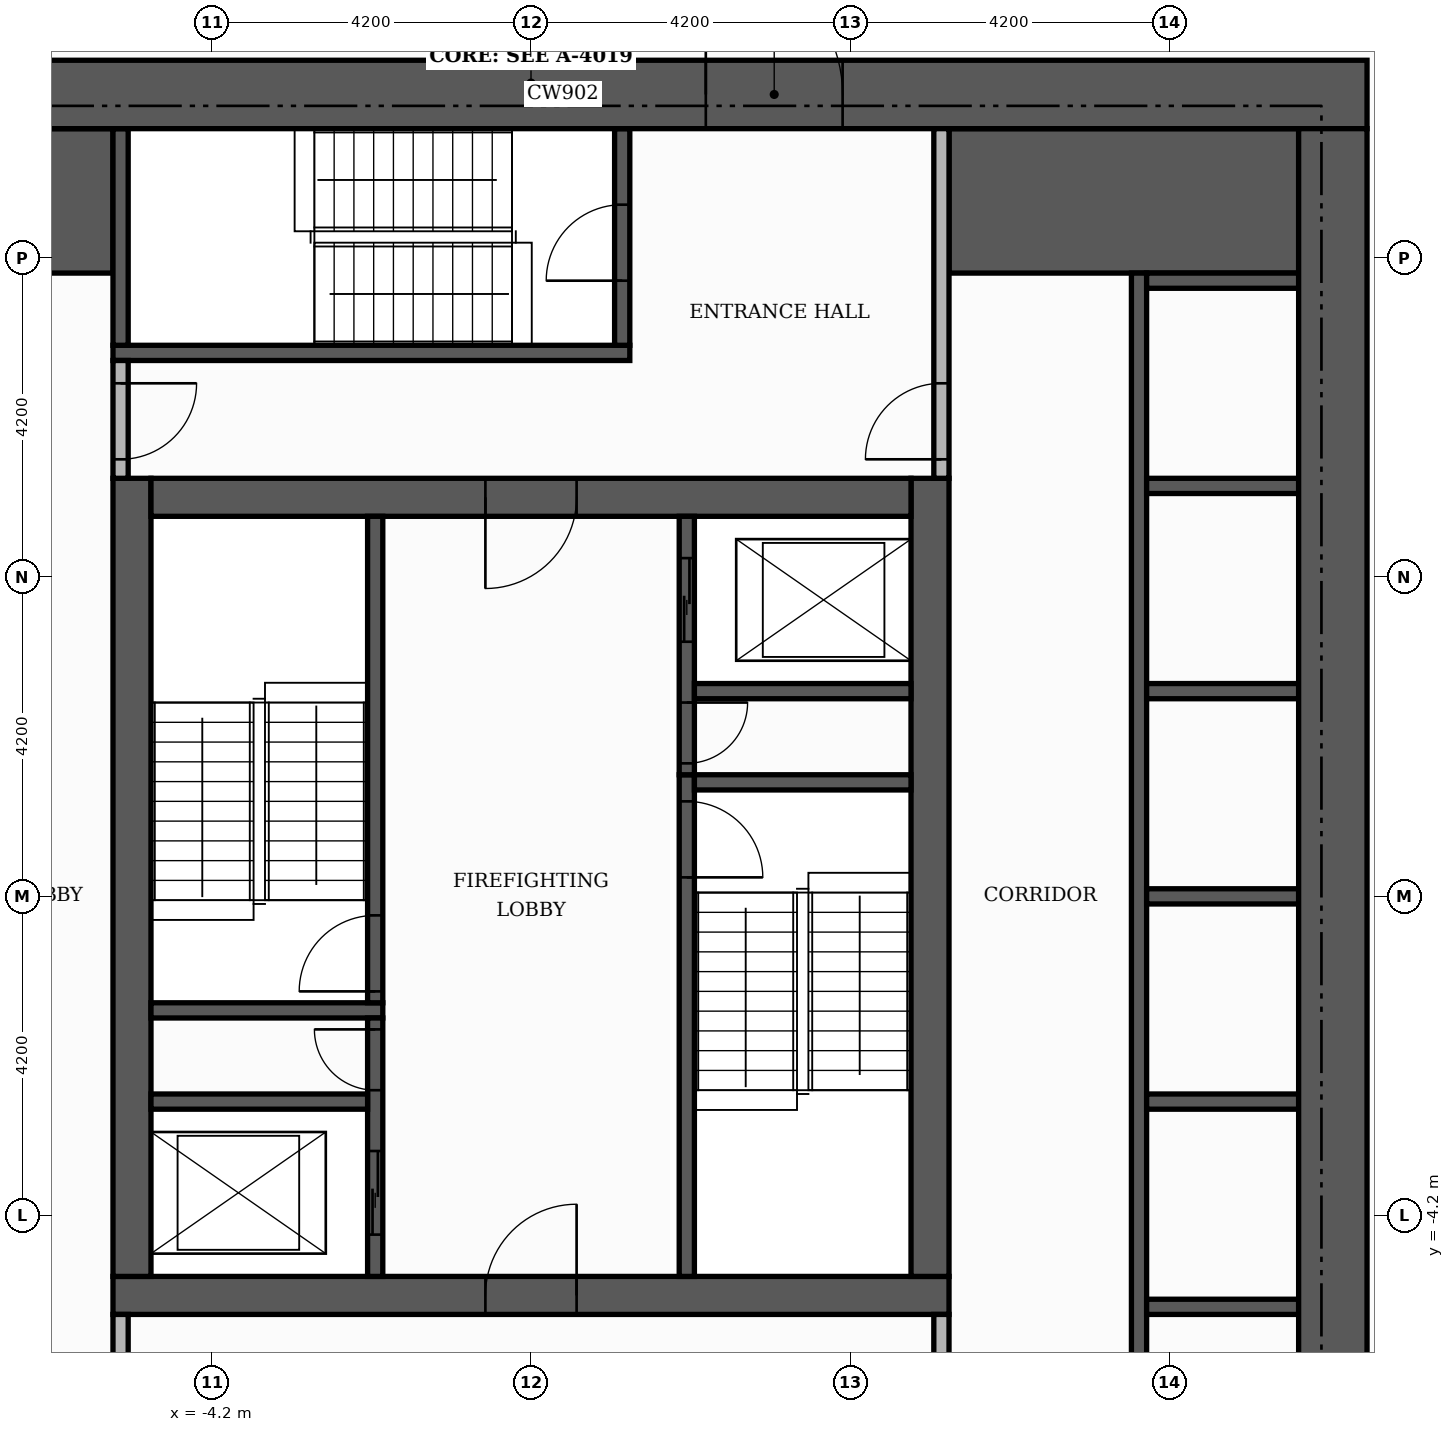
"""IFC4 building model, lengths in metres.
Left out: names, types, materials, properties, quantities, classifications, styles, units other than length and angle.
Written with IfcOpenShell. Run it as: python <this file> out.ifc"""

import sys

from ifc_helpers import new_model, si_unit, direction, frame, frame_2d, origin, place, context, subcontext, project, spatial, rectangle, extrude, element, fill, save


model = new_model("IFC4")
c1 = context("Model", 3, precision=1e-05, world=origin(), true_north=direction((0.0, 1.0)))
c2 = subcontext(c1, "Body", "Model", "MODEL_VIEW")
j1 = project(units=[si_unit("LENGTHUNIT", "METRE"), si_unit("PLANEANGLEUNIT", "RADIAN")], contexts=[c1])
p1 = place(None, origin())
s1 = spatial("IfcSite", under=j1, at=p1, CompositionType="ELEMENT")
p2 = place(p1, origin())
s2 = spatial("IfcBuilding", under=s1, at=p2, CompositionType="ELEMENT")
p3 = place(p2, frame((0.0, 0.0, 122.1)))
s3 = spatial("IfcBuildingStorey", under=s2, at=p3, CompositionType="ELEMENT", Elevation=122.1)
p4 = place(p3, frame((-5.5, -5.25, 0.0), z_axis=(0.0, 0.0, 1.0), x_axis=(1.0, 0.0, 0.0)))
e1 = element("IfcWall", 1, at=p4, inside=s3, PredefinedType="SHEAR", context=c2, shape_type="SweptSolid", body=[
    extrude(rectangle(XDim=11.0, YDim=0.5, at=frame_2d((5.5, 0.0))), origin(), (0.0, 0.0, 1.0), 3.4),
])
p5 = place(p4, frame((4.9, 0.0, 0.0)))
e2 = element("IfcOpeningElement", 2, at=p5, cuts=e1, PredefinedType="OPENING", context=c2, shape_type="SweptSolid", body=[
    extrude(rectangle(XDim=1.2, YDim=2.1, at=frame_2d((0.6, 1.05))), frame((0.0, 0.26, 0.0), z_axis=(0.0, -1.0, 0.0), x_axis=(1.0, 0.0, 0.0)), (0.0, 0.0, 1.0), 0.52),
])
for number, where, z_axis, x_axis in (
    (3, (-5.25, -5.0, 0.0), (0.0, 0.0, 1.0), (0.0, 1.0, 0.0)),
    (4, (5.25, -5.0, 0.0), (0.0, 0.0, 1.0), (0.0, 1.0, 0.0)),
):
    element("IfcWall", number, at=place(p3, frame(where, z_axis=z_axis, x_axis=x_axis)), inside=s3, PredefinedType="SHEAR", context=c2, shape_type="SweptSolid", body=[
        extrude(rectangle(XDim=10.5, YDim=0.5, at=frame_2d((5.25, 0.0))), origin(), (0.0, 0.0, 1.0), 3.4),
    ])
p6 = place(p3, frame((-5.0, 5.25, 0.0), z_axis=(0.0, 0.0, 1.0), x_axis=(1.0, 0.0, 0.0)))
e5 = element("IfcWall", 5, at=p6, inside=s3, PredefinedType="SHEAR", context=c2, shape_type="SweptSolid", body=[
    extrude(rectangle(XDim=10.0, YDim=0.5, at=frame_2d((5.0, 0.0))), origin(), (0.0, 0.0, 1.0), 3.4),
])
p7 = place(p6, frame((4.4, 0.0, 0.0)))
e6 = element("IfcOpeningElement", 6, at=p7, cuts=e5, PredefinedType="OPENING", context=c2, shape_type="SweptSolid", body=[
    extrude(rectangle(XDim=1.2, YDim=2.1, at=frame_2d((0.6, 1.05))), frame((0.0, 0.26, 0.0), z_axis=(0.0, -1.0, 0.0), x_axis=(1.0, 0.0, 0.0)), (0.0, 0.0, 1.0), 0.52),
])
for number, where, z_axis, x_axis in (
    (7, (-10.1, 9.15, 0.0), (0.0, 0.0, 1.0), (1.0, 0.0, 0.0)),
    (8, (5.5, 9.15, 0.0), (0.0, 0.0, 1.0), (1.0, 0.0, 0.0)),
):
    element("IfcWall", number, at=place(p3, frame(where, z_axis=z_axis, x_axis=x_axis)), inside=s3, PredefinedType="SHEAR", context=c2, shape_type="SweptSolid", body=[
        extrude(rectangle(XDim=4.6, YDim=1.9, at=frame_2d((2.3, 0.0))), origin(), (0.0, 0.0, 1.0), 3.4),
    ])
p8 = place(p3, frame((2.05, -5.0, 0.0), z_axis=(0.0, 0.0, 1.0), x_axis=(0.0, 1.0, 0.0)))
e9 = element("IfcWall", 9, at=p8, inside=s3, PredefinedType="SHEAR", context=c2, shape_type="SweptSolid", body=[
    extrude(rectangle(XDim=6.6, YDim=0.2, at=frame_2d((3.3, 0.0))), origin(), (0.0, 0.0, 1.0), 3.4),
])
p9 = place(p8, frame((5.25, 0.0, 0.0)))
e10 = element("IfcOpeningElement", 10, at=p9, cuts=e9, PredefinedType="OPENING", context=c2, shape_type="SweptSolid", body=[
    extrude(rectangle(XDim=1.0, YDim=2.1, at=frame_2d((0.5, 1.05))), frame((0.0, 0.11, 0.0), z_axis=(0.0, -1.0, 0.0), x_axis=(1.0, 0.0, 0.0)), (0.0, 0.0, 1.0), 0.22),
])
p10 = place(p3, frame((-5.0, -1.5, 0.0), z_axis=(0.0, 0.0, 1.0), x_axis=(1.0, 0.0, 0.0)))
e11 = element("IfcWall", 11, at=p10, inside=s3, PredefinedType="SHEAR", context=c2, shape_type="SweptSolid", body=[
    extrude(rectangle(XDim=3.05, YDim=0.2, at=frame_2d((1.525, 0.0))), origin(), (0.0, 0.0, 1.0), 3.4),
])
p11 = place(p3, frame((-2.05, -1.4, 0.0), z_axis=(0.0, 0.0, 1.0), x_axis=(0.0, 1.0, 0.0)))
e12 = element("IfcWall", 12, at=p11, inside=s3, PredefinedType="SHEAR", context=c2, shape_type="SweptSolid", body=[
    extrude(rectangle(XDim=6.4, YDim=0.2, at=frame_2d((3.2, 0.0))), origin(), (0.0, 0.0, 1.0), 3.4),
])
p12 = place(p11, frame((0.15, 0.0, 0.0)))
e13 = element("IfcOpeningElement", 13, at=p12, cuts=e12, PredefinedType="OPENING", context=c2, shape_type="SweptSolid", body=[
    extrude(rectangle(XDim=1.0, YDim=2.1, at=frame_2d((0.5, 1.05))), frame((0.0, 0.11, 0.0), z_axis=(0.0, -1.0, 0.0), x_axis=(1.0, 0.0, 0.0)), (0.0, 0.0, 1.0), 0.22),
])
p13 = place(p3, frame((2.15, 1.5, 0.0), z_axis=(0.0, 0.0, 1.0), x_axis=(1.0, 0.0, 0.0)))
e14 = element("IfcWall", 14, at=p13, inside=s3, PredefinedType="SHEAR", context=c2, shape_type="SweptSolid", body=[
    extrude(rectangle(XDim=2.85, YDim=0.2, at=frame_2d((1.425, 0.0))), origin(), (0.0, 0.0, 1.0), 3.4),
])
p14 = place(p3, frame((-5.5, 7.15, 0.0), z_axis=(0.0, 0.0, 1.0), x_axis=(1.0, 0.0, 0.0)))
e15 = element("IfcWall", 15, at=p14, inside=s3, PredefinedType="SHEAR", context=c2, shape_type="SweptSolid", body=[
    extrude(rectangle(XDim=6.8, YDim=0.2, at=frame_2d((3.4, 0.0))), origin(), (0.0, 0.0, 1.0), 3.4),
])
p15 = place(p3, frame((-5.4, 7.25, 0.0), z_axis=(0.0, 0.0, 1.0), x_axis=(0.0, 1.0, 0.0)))
e16 = element("IfcWall", 16, at=p15, inside=s3, PredefinedType="SHEAR", context=c2, shape_type="SweptSolid", body=[
    extrude(rectangle(XDim=2.85, YDim=0.2, at=frame_2d((1.425, 0.0))), origin(), (0.0, 0.0, 1.0), 3.4),
])
p16 = place(p3, frame((1.2, 7.25, 0.0), z_axis=(0.0, 0.0, 1.0), x_axis=(0.0, 1.0, 0.0)))
e17 = element("IfcWall", 17, at=p16, inside=s3, PredefinedType="SHEAR", context=c2, shape_type="SweptSolid", body=[
    extrude(rectangle(XDim=2.85, YDim=0.2, at=frame_2d((1.425, 0.0))), origin(), (0.0, 0.0, 1.0), 3.4),
])
p17 = place(p16, frame((0.85, 0.0, 0.0)))
e18 = element("IfcOpeningElement", 18, at=p17, cuts=e17, PredefinedType="OPENING", context=c2, shape_type="SweptSolid", body=[
    extrude(rectangle(XDim=1.0, YDim=2.1, at=frame_2d((0.5, 1.05))), frame((0.0, 0.11, 0.0), z_axis=(0.0, -1.0, 0.0), x_axis=(1.0, 0.0, 0.0)), (0.0, 0.0, 1.0), 0.22),
])
p18 = place(p3, frame((8.0, -8.2, 0.0), z_axis=(0.0, 0.0, 1.0), x_axis=(0.0, 1.0, 0.0)))
e19 = element("IfcWall", 19, at=p18, inside=s3, PredefinedType="SHEAR", context=c2, shape_type="SweptSolid", body=[
    extrude(rectangle(XDim=16.4, YDim=0.2, at=frame_2d((8.2, 0.0))), origin(), (0.0, 0.0, 1.0), 3.4),
])
p19 = place(p3, frame((8.1, -5.4, 0.0), z_axis=(0.0, 0.0, 1.0), x_axis=(1.0, 0.0, 0.0)))
e20 = element("IfcWall", 20, at=p19, inside=s3, PredefinedType="SHEAR", context=c2, shape_type="SweptSolid", body=[
    extrude(rectangle(XDim=2.0, YDim=0.2, at=frame_2d((1.0, 0.0))), origin(), (0.0, 0.0, 1.0), 3.4),
])
p20 = place(p3, frame((-2.05, -5.0, 0.0), z_axis=(0.0, 0.0, 1.0), x_axis=(0.0, 1.0, 0.0)))
e21 = element("IfcWall", 21, at=p20, inside=s3, PredefinedType="SHEAR", context=c2, shape_type="SweptSolid", body=[
    extrude(rectangle(XDim=3.4, YDim=0.2, at=frame_2d((1.7, 0.0))), origin(), (0.0, 0.0, 1.0), 3.4),
])
p21 = place(p20, frame((0.55, 0.0, 0.0)))
e22 = element("IfcOpeningElement", 22, at=p21, cuts=e21, PredefinedType="OPENING", context=c2, shape_type="SweptSolid", body=[
    extrude(rectangle(XDim=1.1, YDim=2.1, at=frame_2d((0.55, 1.05))), frame((0.0, 0.11, 0.0), z_axis=(0.0, -1.0, 0.0), x_axis=(1.0, 0.0, 0.0)), (0.0, 0.0, 1.0), 0.22),
])
p22 = place(p20, frame((2.45, 0.0, 0.0)))
e23 = element("IfcOpeningElement", 23, at=p22, cuts=e21, PredefinedType="OPENING", context=c2, shape_type="SweptSolid", body=[
    extrude(rectangle(XDim=0.8, YDim=2.1, at=frame_2d((0.4, 1.05))), frame((0.0, 0.11, 0.0), z_axis=(0.0, -1.0, 0.0), x_axis=(1.0, 0.0, 0.0)), (0.0, 0.0, 1.0), 0.22),
])
p23 = place(p3, frame((-5.0, -2.7, 0.0), z_axis=(0.0, 0.0, 1.0), x_axis=(1.0, 0.0, 0.0)))
e24 = element("IfcWall", 24, at=p23, inside=s3, PredefinedType="SHEAR", context=c2, shape_type="SweptSolid", body=[
    extrude(rectangle(XDim=2.85, YDim=0.2, at=frame_2d((1.425, 0.0))), origin(), (0.0, 0.0, 1.0), 3.4),
])
for number, where, z_axis, x_axis in (
    (25, (8.1, -2.7, 0.0), (0.0, 0.0, 1.0), (1.0, 0.0, 0.0)),
    (26, (8.1, 0.0, 0.0), (0.0, 0.0, 1.0), (1.0, 0.0, 0.0)),
):
    element("IfcWall", number, at=place(p3, frame(where, z_axis=z_axis, x_axis=x_axis)), inside=s3, PredefinedType="SHEAR", context=c2, shape_type="SweptSolid", body=[
        extrude(rectangle(XDim=2.0, YDim=0.2, at=frame_2d((1.0, 0.0))), origin(), (0.0, 0.0, 1.0), 3.4),
    ])
p24 = place(p3, frame((2.05, 1.6, 0.0), z_axis=(0.0, 0.0, 1.0), x_axis=(0.0, 1.0, 0.0)))
e27 = element("IfcWall", 27, at=p24, inside=s3, PredefinedType="SHEAR", context=c2, shape_type="SweptSolid", body=[
    extrude(rectangle(XDim=3.4, YDim=0.2, at=frame_2d((1.7, 0.0))), origin(), (0.0, 0.0, 1.0), 3.4),
])
p25 = place(p24, frame((1.75, 0.0, 0.0)))
e28 = element("IfcOpeningElement", 28, at=p25, cuts=e27, PredefinedType="OPENING", context=c2, shape_type="SweptSolid", body=[
    extrude(rectangle(XDim=1.1, YDim=2.1, at=frame_2d((0.55, 1.05))), frame((0.0, 0.11, 0.0), z_axis=(0.0, -1.0, 0.0), x_axis=(1.0, 0.0, 0.0)), (0.0, 0.0, 1.0), 0.22),
])
p26 = place(p24, frame((0.15, 0.0, 0.0)))
e29 = element("IfcOpeningElement", 29, at=p26, cuts=e27, PredefinedType="OPENING", context=c2, shape_type="SweptSolid", body=[
    extrude(rectangle(XDim=0.8, YDim=2.1, at=frame_2d((0.4, 1.05))), frame((0.0, 0.11, 0.0), z_axis=(0.0, -1.0, 0.0), x_axis=(1.0, 0.0, 0.0)), (0.0, 0.0, 1.0), 0.22),
])
p27 = place(p3, frame((2.15, 2.7, 0.0), z_axis=(0.0, 0.0, 1.0), x_axis=(1.0, 0.0, 0.0)))
e30 = element("IfcWall", 30, at=p27, inside=s3, PredefinedType="SHEAR", context=c2, shape_type="SweptSolid", body=[
    extrude(rectangle(XDim=2.85, YDim=0.2, at=frame_2d((1.425, 0.0))), origin(), (0.0, 0.0, 1.0), 3.4),
])
for number, where, z_axis, x_axis in (
    (31, (8.1, 2.7, 0.0), (0.0, 0.0, 1.0), (1.0, 0.0, 0.0)),
    (32, (8.1, 5.4, 0.0), (0.0, 0.0, 1.0), (1.0, 0.0, 0.0)),
    (33, (8.1, 8.1, 0.0), (0.0, 0.0, 1.0), (1.0, 0.0, 0.0)),
):
    element("IfcWall", number, at=place(p3, frame(where, z_axis=z_axis, x_axis=x_axis)), inside=s3, PredefinedType="SHEAR", context=c2, shape_type="SweptSolid", body=[
        extrude(rectangle(XDim=2.0, YDim=0.2, at=frame_2d((1.0, 0.0))), origin(), (0.0, 0.0, 1.0), 3.4),
    ])
p28 = place(p3, frame((-11.0, 10.55, 0.0), z_axis=(0.0, 0.0, 1.0), x_axis=(1.0, 0.0, 0.0)))
e34 = element("IfcWall", 34, at=p28, inside=s3, PredefinedType="SHEAR", context=c2, shape_type="SweptSolid", body=[
    extrude(rectangle(XDim=22.0, YDim=0.9, at=frame_2d((11.0, 0.0))), origin(), (0.0, 0.0, 1.0), 3.4),
])
p29 = place(p28, frame((13.3, 0.0, 0.0)))
e35 = element("IfcOpeningElement", 35, at=p29, cuts=e34, PredefinedType="OPENING", context=c2, shape_type="SweptSolid", body=[
    extrude(rectangle(XDim=1.8, YDim=2.2, at=frame_2d((0.9, 1.1))), frame((0.0, 0.46, 0.0), z_axis=(0.0, -1.0, 0.0), x_axis=(1.0, 0.0, 0.0)), (0.0, 0.0, 1.0), 0.92),
])
p30 = place(p3, frame((10.55, -10.1, 0.0), z_axis=(0.0, 0.0, 1.0), x_axis=(0.0, 1.0, 0.0)))
e36 = element("IfcWall", 36, at=p30, inside=s3, PredefinedType="SHEAR", context=c2, shape_type="SweptSolid", body=[
    extrude(rectangle(XDim=20.2, YDim=0.9, at=frame_2d((10.1, 0.0))), origin(), (0.0, 0.0, 1.0), 3.4),
])
p31 = place(p3, frame((-5.4, -10.1, 0.0), z_axis=(0.0, 0.0, 1.0), x_axis=(0.0, 1.0, 0.0)))
e37 = element("IfcWall", 37, at=p31, inside=s3, PredefinedType="PARTITIONING", context=c2, shape_type="SweptSolid", body=[
    extrude(rectangle(XDim=4.6, YDim=0.2, at=frame_2d((2.3, 0.0))), origin(), (0.0, 0.0, 1.0), 3.4),
])
p32 = place(p31, frame((2.9, 0.0, 0.0)))
e38 = element("IfcOpeningElement", 38, at=p32, cuts=e37, PredefinedType="OPENING", context=c2, shape_type="SweptSolid", body=[
    extrude(rectangle(XDim=1.0, YDim=2.1, at=frame_2d((0.5, 1.05))), frame((0.0, 0.11, 0.0), z_axis=(0.0, -1.0, 0.0), x_axis=(1.0, 0.0, 0.0)), (0.0, 0.0, 1.0), 0.22),
])
p33 = place(p3, frame((5.4, -7.9, 0.0), z_axis=(0.0, 0.0, 1.0), x_axis=(0.0, 1.0, 0.0)))
e39 = element("IfcWall", 39, at=p33, inside=s3, PredefinedType="PARTITIONING", context=c2, shape_type="SweptSolid", body=[
    extrude(rectangle(XDim=2.4, YDim=0.2, at=frame_2d((1.2, 0.0))), origin(), (0.0, 0.0, 1.0), 3.4),
])
p34 = place(p33, frame((0.7, 0.0, 0.0)))
e40 = element("IfcOpeningElement", 40, at=p34, cuts=e39, PredefinedType="OPENING", context=c2, shape_type="SweptSolid", body=[
    extrude(rectangle(XDim=1.0, YDim=2.1, at=frame_2d((0.5, 1.05))), frame((0.0, 0.11, 0.0), z_axis=(0.0, -1.0, 0.0), x_axis=(1.0, 0.0, 0.0)), (0.0, 0.0, 1.0), 0.22),
])
p35 = place(p3, frame((-5.4, 5.5, 0.0), z_axis=(0.0, 0.0, 1.0), x_axis=(0.0, 1.0, 0.0)))
e41 = element("IfcWall", 41, at=p35, inside=s3, PredefinedType="PARTITIONING", context=c2, shape_type="SweptSolid", body=[
    extrude(rectangle(XDim=1.55, YDim=0.2, at=frame_2d((0.775, 0.0))), origin(), (0.0, 0.0, 1.0), 3.4),
])
p36 = place(p35, frame((0.25, 0.0, 0.0)))
e42 = element("IfcOpeningElement", 42, at=p36, cuts=e41, PredefinedType="OPENING", context=c2, shape_type="SweptSolid", body=[
    extrude(rectangle(XDim=1.0, YDim=2.1, at=frame_2d((0.5, 1.05))), frame((0.0, 0.11, 0.0), z_axis=(0.0, -1.0, 0.0), x_axis=(1.0, 0.0, 0.0)), (0.0, 0.0, 1.0), 0.22),
])
p37 = place(p3, frame((5.4, 5.5, 0.0), z_axis=(0.0, 0.0, 1.0), x_axis=(0.0, 1.0, 0.0)))
e43 = element("IfcWall", 43, at=p37, inside=s3, PredefinedType="PARTITIONING", context=c2, shape_type="SweptSolid", body=[
    extrude(rectangle(XDim=4.6, YDim=0.2, at=frame_2d((2.3, 0.0))), origin(), (0.0, 0.0, 1.0), 3.4),
])
p38 = place(p37, frame((0.25, 0.0, 0.0)))
e44 = element("IfcOpeningElement", 44, at=p38, cuts=e43, PredefinedType="OPENING", context=c2, shape_type="SweptSolid", body=[
    extrude(rectangle(XDim=1.0, YDim=2.1, at=frame_2d((0.5, 1.05))), frame((0.0, 0.11, 0.0), z_axis=(0.0, -1.0, 0.0), x_axis=(1.0, 0.0, 0.0)), (0.0, 0.0, 1.0), 0.22),
])
p39 = place(p25, origin())
e45 = element("IfcDoor", 45, at=p39, inside=s3, OperationType="SLIDING_TO_LEFT", PredefinedType="DOOR", context=c2, shape_type="SweptSolid", body=[
    extrude(rectangle(XDim=1.1, YDim=2.1, at=frame_2d((0.55, 1.05))), frame((0.0, 0.025, 0.0), z_axis=(0.0, -1.0, 0.0), x_axis=(1.0, 0.0, 0.0)), (0.0, 0.0, 1.0), 0.05),
])
fill(e28, e45)
p40 = place(p21, origin())
e46 = element("IfcDoor", 46, at=p40, inside=s3, OperationType="SLIDING_TO_LEFT", PredefinedType="DOOR", context=c2, shape_type="SweptSolid", body=[
    extrude(rectangle(XDim=1.1, YDim=2.1, at=frame_2d((0.55, 1.05))), frame((0.0, 0.025, 0.0), z_axis=(0.0, -1.0, 0.0), x_axis=(1.0, 0.0, 0.0)), (0.0, 0.0, 1.0), 0.05),
])
fill(e22, e46)
p41 = place(p12, origin())
e47 = element("IfcDoor", 47, at=p41, inside=s3, OperationType="SINGLE_SWING_LEFT", PredefinedType="DOOR", context=c2, shape_type="SweptSolid", body=[
    extrude(rectangle(XDim=1.0, YDim=2.1, at=frame_2d((0.5, 1.05))), frame((0.0, 0.025, 0.0), z_axis=(0.0, -1.0, 0.0), x_axis=(1.0, 0.0, 0.0)), (0.0, 0.0, 1.0), 0.05),
])
fill(e13, e47)
p42 = place(p9, frame((1.0, 0.0, 0.0), z_axis=(0.0, 0.0, 1.0), x_axis=(-1.0, 0.0, 0.0)))
e48 = element("IfcDoor", 48, at=p42, inside=s3, OperationType="SINGLE_SWING_LEFT", PredefinedType="DOOR", context=c2, shape_type="SweptSolid", body=[
    extrude(rectangle(XDim=1.0, YDim=2.1, at=frame_2d((0.5, 1.05))), frame((0.0, 0.025, 0.0), z_axis=(0.0, -1.0, 0.0), x_axis=(1.0, 0.0, 0.0)), (0.0, 0.0, 1.0), 0.05),
])
fill(e10, e48)
p43 = place(p26, frame((0.8, 0.0, 0.0), z_axis=(0.0, 0.0, 1.0), x_axis=(-1.0, 0.0, 0.0)))
e49 = element("IfcDoor", 49, at=p43, inside=s3, OperationType="SINGLE_SWING_RIGHT", PredefinedType="DOOR", context=c2, shape_type="SweptSolid", body=[
    extrude(rectangle(XDim=0.8, YDim=2.1, at=frame_2d((0.4, 1.05))), frame((0.0, 0.025, 0.0), z_axis=(0.0, -1.0, 0.0), x_axis=(1.0, 0.0, 0.0)), (0.0, 0.0, 1.0), 0.05),
])
fill(e29, e49)
p44 = place(p22, origin())
e50 = element("IfcDoor", 50, at=p44, inside=s3, OperationType="SINGLE_SWING_RIGHT", PredefinedType="DOOR", context=c2, shape_type="SweptSolid", body=[
    extrude(rectangle(XDim=0.8, YDim=2.1, at=frame_2d((0.4, 1.05))), frame((0.0, 0.025, 0.0), z_axis=(0.0, -1.0, 0.0), x_axis=(1.0, 0.0, 0.0)), (0.0, 0.0, 1.0), 0.05),
])
fill(e23, e50)
p45 = place(p7, frame((1.2, 0.0, 0.0), z_axis=(0.0, 0.0, 1.0), x_axis=(-1.0, 0.0, 0.0)))
e51 = element("IfcDoor", 51, at=p45, inside=s3, OperationType="SINGLE_SWING_LEFT", PredefinedType="DOOR", context=c2, shape_type="SweptSolid", body=[
    extrude(rectangle(XDim=1.2, YDim=2.1, at=frame_2d((0.6, 1.05))), frame((0.0, 0.025, 0.0), z_axis=(0.0, -1.0, 0.0), x_axis=(1.0, 0.0, 0.0)), (0.0, 0.0, 1.0), 0.05),
])
fill(e6, e51)
p46 = place(p5, origin())
e52 = element("IfcDoor", 52, at=p46, inside=s3, OperationType="SINGLE_SWING_RIGHT", PredefinedType="DOOR", context=c2, shape_type="SweptSolid", body=[
    extrude(rectangle(XDim=1.2, YDim=2.1, at=frame_2d((0.6, 1.05))), frame((0.0, 0.025, 0.0), z_axis=(0.0, -1.0, 0.0), x_axis=(1.0, 0.0, 0.0)), (0.0, 0.0, 1.0), 0.05),
])
fill(e2, e52)
p47 = place(p17, origin())
e53 = element("IfcDoor", 53, at=p47, inside=s3, OperationType="SINGLE_SWING_LEFT", PredefinedType="DOOR", context=c2, shape_type="SweptSolid", body=[
    extrude(rectangle(XDim=1.0, YDim=2.1, at=frame_2d((0.5, 1.05))), frame((0.0, 0.025, 0.0), z_axis=(0.0, -1.0, 0.0), x_axis=(1.0, 0.0, 0.0)), (0.0, 0.0, 1.0), 0.05),
])
fill(e18, e53)
p48 = place(p36, frame((1.0, 0.0, 0.0), z_axis=(0.0, 0.0, 1.0), x_axis=(-1.0, 0.0, 0.0)))
e54 = element("IfcDoor", 54, at=p48, inside=s3, OperationType="SINGLE_SWING_RIGHT", PredefinedType="DOOR", context=c2, shape_type="SweptSolid", body=[
    extrude(rectangle(XDim=1.0, YDim=2.1, at=frame_2d((0.5, 1.05))), frame((0.0, 0.025, 0.0), z_axis=(0.0, -1.0, 0.0), x_axis=(1.0, 0.0, 0.0)), (0.0, 0.0, 1.0), 0.05),
])
fill(e42, e54)
p49 = place(p38, origin())
e55 = element("IfcDoor", 55, at=p49, inside=s3, OperationType="SINGLE_SWING_LEFT", PredefinedType="DOOR", context=c2, shape_type="SweptSolid", body=[
    extrude(rectangle(XDim=1.0, YDim=2.1, at=frame_2d((0.5, 1.05))), frame((0.0, 0.025, 0.0), z_axis=(0.0, -1.0, 0.0), x_axis=(1.0, 0.0, 0.0)), (0.0, 0.0, 1.0), 0.05),
])
fill(e44, e55)
p50 = place(p29, origin())
e56 = element("IfcDoor", 56, at=p50, inside=s3, OperationType="DOUBLE_DOOR_SINGLE_SWING", PredefinedType="DOOR", context=c2, shape_type="SweptSolid", body=[
    extrude(rectangle(XDim=1.8, YDim=2.2, at=frame_2d((0.9, 1.1))), frame((0.0, 0.025, 0.0), z_axis=(0.0, -1.0, 0.0), x_axis=(1.0, 0.0, 0.0)), (0.0, 0.0, 1.0), 0.05),
])
fill(e35, e56)
save(model, sys.argv[1])
